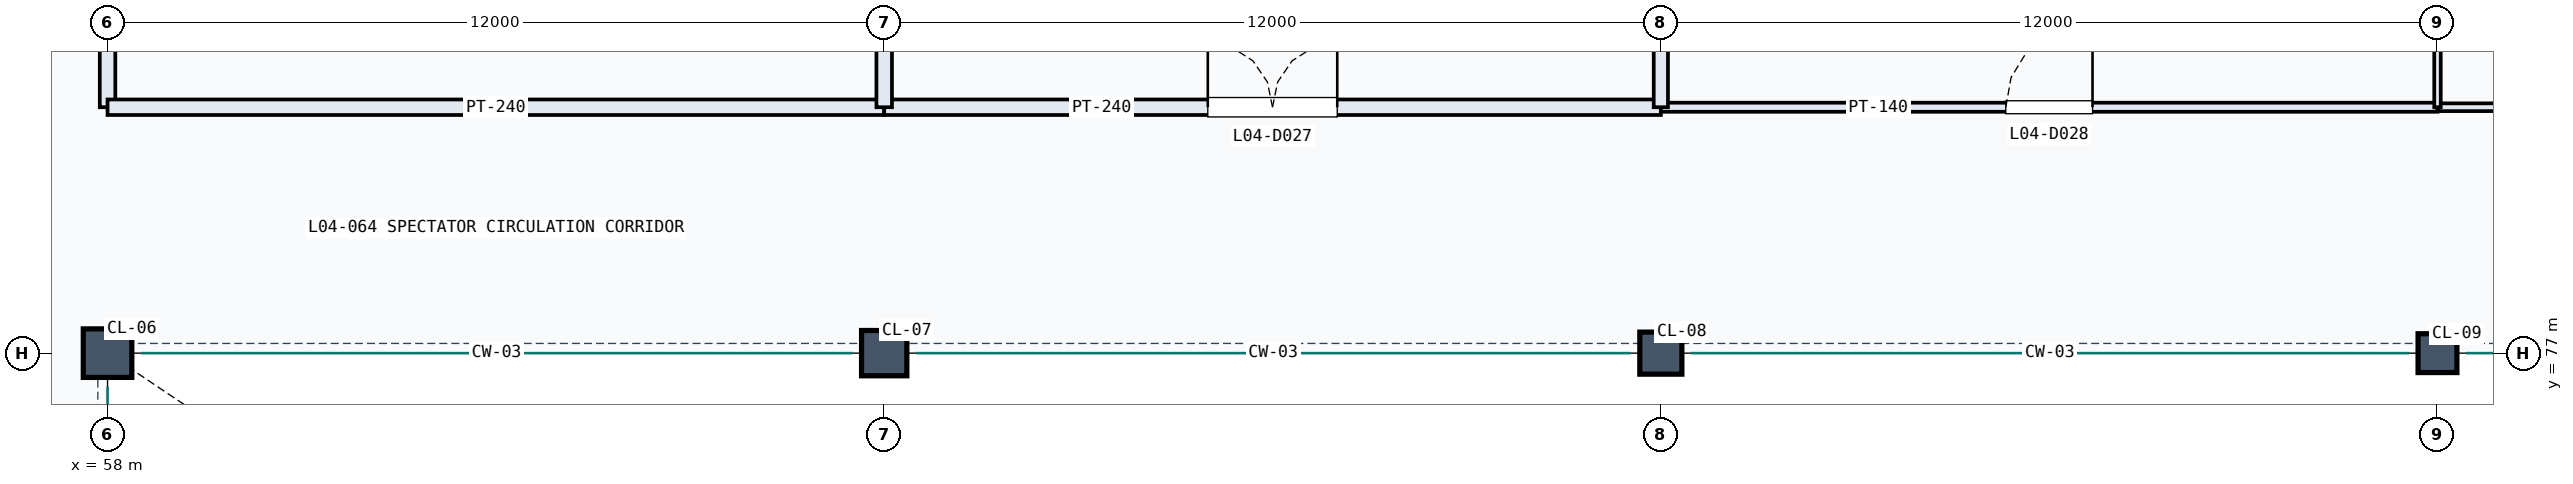
"""IFC4 building model, lengths in metres.
Left out: names, types, materials, properties, quantities, classifications, styles, units other than length and angle.
Written with IfcOpenShell. Run it as: python <this file> out.ifc"""

import sys

from ifc_helpers import new_model, si_unit, direction, frame, frame_2d, origin, origin_2d, place, context, subcontext, project, spatial, rectangle, extrude, element, fill, save


model = new_model("IFC4")
c1 = context("Model", 3, precision=1e-05, world=origin(), true_north=direction((0.0, 1.0)))
c2 = subcontext(c1, "Body", "Model", "MODEL_VIEW")
j1 = project(units=[si_unit("LENGTHUNIT", "METRE"), si_unit("PLANEANGLEUNIT", "RADIAN")], contexts=[c1])
p1 = place(None, origin())
s1 = spatial("IfcSite", under=j1, at=p1, CompositionType="ELEMENT")
p2 = place(p1, origin())
s2 = spatial("IfcBuilding", under=s1, at=p2, CompositionType="ELEMENT")
p3 = place(p2, frame((0.0, 0.0, 19.5)))
s3 = spatial("IfcBuildingStorey", under=s2, at=p3, CompositionType="ELEMENT", Elevation=19.5)
p4 = place(p3, frame((58.0, 77.0, 0.0), z_axis=(0.0, 0.0, 1.0), x_axis=(1.0, 0.0, 0.0)))
e1 = element("IfcColumn", 1, at=p4, inside=s3, PredefinedType="COLUMN", context=c2, shape_type="SweptSolid", body=[
    extrude(rectangle(XDim=0.75, YDim=0.75, at=origin_2d()), origin(), (0.0, 0.0, 1.0), 4.8),
])
p5 = place(p3, frame((70.0, 77.0, 0.0), z_axis=(0.0, 0.0, 1.0), x_axis=(1.0, 0.0, 0.0)))
e2 = element("IfcColumn", 2, at=p5, inside=s3, PredefinedType="COLUMN", context=c2, shape_type="SweptSolid", body=[
    extrude(rectangle(XDim=0.7, YDim=0.7, at=origin_2d()), origin(), (0.0, 0.0, 1.0), 4.8),
])
p6 = place(p3, frame((82.0, 77.0, 0.0), z_axis=(0.0, 0.0, 1.0), x_axis=(1.0, 0.0, 0.0)))
e3 = element("IfcColumn", 3, at=p6, inside=s3, PredefinedType="COLUMN", context=c2, shape_type="SweptSolid", body=[
    extrude(rectangle(XDim=0.65, YDim=0.65, at=origin_2d()), origin(), (0.0, 0.0, 1.0), 4.8),
])
p7 = place(p3, frame((94.0, 77.0, 0.0), z_axis=(0.0, 0.0, 1.0), x_axis=(1.0, 0.0, 0.0)))
e4 = element("IfcColumn", 4, at=p7, inside=s3, PredefinedType="COLUMN", context=c2, shape_type="SweptSolid", body=[
    extrude(rectangle(XDim=0.6, YDim=0.6, at=origin_2d()), origin(), (0.0, 0.0, 1.0), 4.8),
])
p8 = place(p3, frame((58.0, 80.8, 0.0), z_axis=(0.0, 0.0, 1.0), x_axis=(0.0, 1.0, 0.0)))
e5 = element("IfcWall", 5, at=p8, inside=s3, PredefinedType="PARTITIONING", context=c2, shape_type="SweptSolid", body=[
    extrude(rectangle(XDim=6.98, YDim=0.24, at=frame_2d((3.49, 0.0))), origin(), (0.0, 0.0, 1.0), 3.44),
])
p9 = place(p8, frame((2.615, 0.0, 0.0)))
e6 = element("IfcOpeningElement", 6, at=p9, cuts=e5, PredefinedType="OPENING", context=c2, shape_type="SweptSolid", body=[
    extrude(rectangle(XDim=1.75, YDim=2.25, at=frame_2d((0.875, 1.125))), frame((0.0, 0.13, 0.0), z_axis=(0.0, -1.0, 0.0), x_axis=(1.0, 0.0, 0.0)), (0.0, 0.0, 1.0), 0.26),
])
p10 = place(p3, frame((58.0, 80.8, 0.0), z_axis=(0.0, 0.0, 1.0), x_axis=(1.0, 0.0, 0.0)))
e7 = element("IfcWall", 7, at=p10, inside=s3, PredefinedType="PARTITIONING", context=c2, shape_type="SweptSolid", body=[
    extrude(rectangle(XDim=12.0, YDim=0.24, at=frame_2d((6.0, 0.0))), origin(), (0.0, 0.0, 1.0), 3.64),
])
p11 = place(p3, frame((70.0, 80.8, 0.0), z_axis=(0.0, 0.0, 1.0), x_axis=(1.0, 0.0, 0.0)))
e8 = element("IfcWall", 8, at=p11, inside=s3, PredefinedType="PARTITIONING", context=c2, shape_type="SweptSolid", body=[
    extrude(rectangle(XDim=12.0, YDim=0.24, at=frame_2d((6.0, 0.0))), origin(), (0.0, 0.0, 1.0), 3.707),
])
p12 = place(p11, frame((5.0, 0.0, 0.0)))
e9 = element("IfcOpeningElement", 9, at=p12, cuts=e8, PredefinedType="OPENING", context=c2, shape_type="SweptSolid", body=[
    extrude(rectangle(XDim=2.0, YDim=2.25, at=frame_2d((1.0, 1.125))), frame((0.0, 0.13, 0.0), z_axis=(0.0, -1.0, 0.0), x_axis=(1.0, 0.0, 0.0)), (0.0, 0.0, 1.0), 0.26),
])
p13 = place(p3, frame((82.0, 80.8, 0.0), z_axis=(0.0, 0.0, 1.0), x_axis=(1.0, 0.0, 0.0)))
e10 = element("IfcWall", 10, at=p13, inside=s3, PredefinedType="PARTITIONING", context=c2, shape_type="SweptSolid", body=[
    extrude(rectangle(XDim=12.0, YDim=0.14, at=frame_2d((6.0, 0.0))), origin(), (0.0, 0.0, 1.0), 3.49),
])
p14 = place(p13, frame((5.33, 0.0, 0.0)))
e11 = element("IfcOpeningElement", 11, at=p14, cuts=e10, PredefinedType="OPENING", context=c2, shape_type="SweptSolid", body=[
    extrude(rectangle(XDim=1.34, YDim=2.15, at=frame_2d((0.67, 1.075))), frame((0.0, 0.08, 0.0), z_axis=(0.0, -1.0, 0.0), x_axis=(1.0, 0.0, 0.0)), (0.0, 0.0, 1.0), 0.16),
])
p15 = place(p3, frame((94.0, 80.8, 0.0), z_axis=(0.0, 0.0, 1.0), x_axis=(1.0, 0.0, 0.0)))
e12 = element("IfcWall", 12, at=p15, inside=s3, PredefinedType="PARTITIONING", context=c2, shape_type="SweptSolid", body=[
    extrude(rectangle(XDim=10.0, YDim=0.12, at=frame_2d((5.0, 0.0))), origin(), (0.0, 0.0, 1.0), 3.49),
])
p16 = place(p15, frame((4.45, 0.0, 0.0)))
e13 = element("IfcOpeningElement", 13, at=p16, cuts=e12, PredefinedType="OPENING", context=c2, shape_type="SweptSolid", body=[
    extrude(rectangle(XDim=1.1, YDim=2.1, at=frame_2d((0.55, 1.05))), frame((0.0, 0.07, 0.0), z_axis=(0.0, -1.0, 0.0), x_axis=(1.0, 0.0, 0.0)), (0.0, 0.0, 1.0), 0.14),
])
p17 = place(p3, frame((70.0, 80.8, 0.0), z_axis=(0.0, 0.0, 1.0), x_axis=(0.0, 1.0, 0.0)))
e14 = element("IfcWall", 14, at=p17, inside=s3, PredefinedType="PARTITIONING", context=c2, shape_type="SweptSolid", body=[
    extrude(rectangle(XDim=14.488, YDim=0.24, at=frame_2d((7.244, 0.0))), origin(), (0.0, 0.0, 1.0), 3.707),
])
p18 = place(p3, frame((82.0, 80.8, 0.0), z_axis=(0.0, 0.0, 1.0), x_axis=(0.0, 1.0, 0.0)))
e15 = element("IfcWall", 15, at=p18, inside=s3, PredefinedType="PARTITIONING", context=c2, shape_type="SweptSolid", body=[
    extrude(rectangle(XDim=15.184, YDim=0.22, at=frame_2d((7.592, 0.0))), origin(), (0.0, 0.0, 1.0), 3.79),
])
p19 = place(p3, frame((94.0, 80.8, 0.0), z_axis=(0.0, 0.0, 1.0), x_axis=(0.0, 1.0, 0.0)))
e16 = element("IfcWall", 16, at=p19, inside=s3, PredefinedType="PARTITIONING", context=c2, shape_type="SweptSolid", body=[
    extrude(rectangle(XDim=14.015, YDim=0.1, at=frame_2d((7.008, 0.0))), origin(), (0.0, 0.0, 1.0), 3.49),
])
p20 = place(p12, origin())
e17 = element("IfcDoor", 17, at=p20, inside=s3, OperationType="DOUBLE_DOOR_SINGLE_SWING", PredefinedType="DOOR", context=c2, shape_type="SweptSolid", body=[
    extrude(rectangle(XDim=2.0, YDim=2.25, at=frame_2d((1.0, 1.125))), frame((0.0, 0.025, 0.0), z_axis=(0.0, -1.0, 0.0), x_axis=(1.0, 0.0, 0.0)), (0.0, 0.0, 1.0), 0.05),
])
fill(e9, e17)
p21 = place(p14, origin())
e18 = element("IfcDoor", 18, at=p21, inside=s3, OperationType="SINGLE_SWING_RIGHT", PredefinedType="DOOR", context=c2, shape_type="SweptSolid", body=[
    extrude(rectangle(XDim=1.34, YDim=2.15, at=frame_2d((0.67, 1.075))), frame((0.0, 0.025, 0.0), z_axis=(0.0, -1.0, 0.0), x_axis=(1.0, 0.0, 0.0)), (0.0, 0.0, 1.0), 0.05),
])
fill(e11, e18)
save(model, sys.argv[1])
